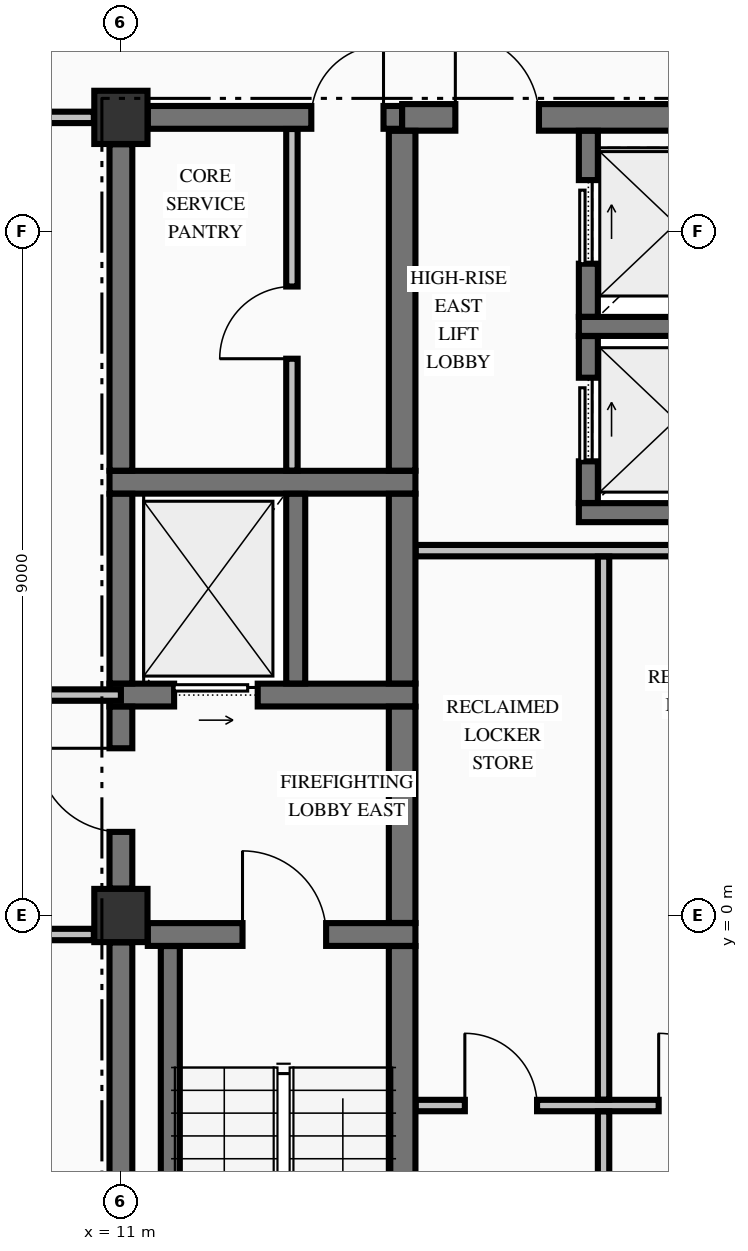
"""IFC4 building model, lengths in metres.
Left out: names, types, materials, properties, quantities, classifications, styles, units other than length and angle.
Written with IfcOpenShell. Run it as: python <this file> out.ifc"""

import sys

from ifc_helpers import new_model, si_unit, direction, frame, frame_2d, origin, origin_2d, place, context, subcontext, project, spatial, rectangle, extrude, element, fill, save


model = new_model("IFC4")
c1 = context("Model", 3, precision=1e-05, world=origin(), true_north=direction((0.0, 1.0)))
c2 = subcontext(c1, "Body", "Model", "MODEL_VIEW")
j1 = project(units=[si_unit("LENGTHUNIT", "METRE"), si_unit("PLANEANGLEUNIT", "RADIAN")], contexts=[c1])
p1 = place(None, origin())
s1 = spatial("IfcSite", under=j1, at=p1, CompositionType="ELEMENT")
p2 = place(p1, origin())
s2 = spatial("IfcBuilding", under=s1, at=p2, CompositionType="ELEMENT")
p3 = place(p2, frame((0.0, 0.0, 242.97)))
s3 = spatial("IfcBuildingStorey", under=s2, at=p3, CompositionType="ELEMENT", Elevation=242.97)
for number, where, z_axis, x_axis in (
    (1, (11.0, 0.0, -0.25), (0.0, 0.0, 1.0), (1.0, 0.0, 0.0)),
    (2, (11.0, 10.5, -0.25), (0.0, 0.0, 1.0), (1.0, 0.0, 0.0)),
):
    element("IfcColumn", number, at=place(p3, frame(where, z_axis=z_axis, x_axis=x_axis)), inside=s3, PredefinedType="COLUMN", context=c2, shape_type="SweptSolid", body=[
        extrude(rectangle(XDim=0.7, YDim=0.7, at=origin_2d()), origin(), (0.0, 0.0, 1.0), 3.23),
    ])
p4 = place(p3, frame((11.354, -0.25, 0.0), z_axis=(0.0, 0.0, 1.0), x_axis=(1.0, 0.0, 0.0)))
e3 = element("IfcWall", 3, at=p4, inside=s3, PredefinedType="SHEAR", context=c2, shape_type="SweptSolid", body=[
    extrude(rectangle(XDim=3.521, YDim=0.3, at=frame_2d((1.76, 0.0))), origin(), (0.0, 0.0, 1.0), 2.98),
])
p5 = place(p4, frame((1.246, 0.0, 0.0)))
e4 = element("IfcOpeningElement", 4, at=p5, cuts=e3, PredefinedType="OPENING", context=c2, shape_type="SweptSolid", body=[
    extrude(rectangle(XDim=1.1, YDim=2.15, at=frame_2d((0.55, 1.075))), frame((0.0, 0.16, 0.0), z_axis=(0.0, -1.0, 0.0), x_axis=(1.0, 0.0, 0.0)), (0.0, 0.0, 1.0), 0.32),
])
p6 = place(p3, frame((10.85, 2.9, 0.0), z_axis=(0.0, 0.0, 1.0), x_axis=(1.0, 0.0, 0.0)))
e5 = element("IfcWall", 5, at=p6, inside=s3, PredefinedType="SHEAR", context=c2, shape_type="SweptSolid", body=[
    extrude(rectangle(XDim=4.025, YDim=0.3, at=frame_2d((2.012, 0.0))), origin(), (0.0, 0.0, 1.0), 2.98),
])
p7 = place(p6, frame((0.85, 0.0, 0.0)))
e6 = element("IfcOpeningElement", 6, at=p7, cuts=e5, PredefinedType="OPENING", context=c2, shape_type="SweptSolid", body=[
    extrude(rectangle(XDim=1.1, YDim=2.2, at=frame_2d((0.55, 1.1))), frame((0.0, 0.16, 0.0), z_axis=(0.0, -1.0, 0.0), x_axis=(1.0, 0.0, 0.0)), (0.0, 0.0, 1.0), 0.32),
])
p8 = place(p3, frame((17.025, 5.3, 0.0), z_axis=(0.0, 0.0, 1.0), x_axis=(1.0, 0.0, 0.0)))
e7 = element("IfcWall", 7, at=p8, inside=s3, PredefinedType="SOLIDWALL", context=c2, shape_type="SweptSolid", body=[
    extrude(rectangle(XDim=3.15, YDim=0.25, at=frame_2d((1.575, 0.0))), origin(), (0.0, 0.0, 1.0), 2.98),
])
p9 = place(p3, frame((10.85, 5.7, 0.0), z_axis=(0.0, 0.0, 1.0), x_axis=(1.0, 0.0, 0.0)))
e8 = element("IfcWall", 8, at=p9, inside=s3, PredefinedType="SHEAR", context=c2, shape_type="SweptSolid", body=[
    extrude(rectangle(XDim=4.025, YDim=0.3, at=frame_2d((2.012, 0.0))), origin(), (0.0, 0.0, 1.0), 2.98),
])
p10 = place(p3, frame((17.025, 7.75, 0.0), z_axis=(0.0, 0.0, 1.0), x_axis=(1.0, 0.0, 0.0)))
e9 = element("IfcWall", 9, at=p10, inside=s3, PredefinedType="SOLIDWALL", context=c2, shape_type="SweptSolid", body=[
    extrude(rectangle(XDim=3.15, YDim=0.25, at=frame_2d((1.575, 0.0))), origin(), (0.0, 0.0, 1.0), 2.98),
])
p11 = place(p3, frame((11.354, 10.5, 0.0), z_axis=(0.0, 0.0, 1.0), x_axis=(1.0, 0.0, 0.0)))
e10 = element("IfcWall", 10, at=p11, inside=s3, PredefinedType="SHEAR", context=c2, shape_type="SweptSolid", body=[
    extrude(rectangle(XDim=3.346, YDim=0.3, at=frame_2d((1.673, 0.0))), origin(), (0.0, 0.0, 1.0), 2.98),
])
p12 = place(p11, frame((2.151, 0.0, 0.0)))
e11 = element("IfcOpeningElement", 11, at=p12, cuts=e10, PredefinedType="OPENING", context=c2, shape_type="SweptSolid", body=[
    extrude(rectangle(XDim=0.95, YDim=2.15, at=frame_2d((0.475, 1.075))), frame((0.0, 0.16, 0.0), z_axis=(0.0, -1.0, 0.0), x_axis=(1.0, 0.0, 0.0)), (0.0, 0.0, 1.0), 0.32),
])
p13 = place(p3, frame((14.7, 10.5, 0.0), z_axis=(0.0, 0.0, 1.0), x_axis=(1.0, 0.0, 0.0)))
e12 = element("IfcWall", 12, at=p13, inside=s3, PredefinedType="SHEAR", context=c2, shape_type="SweptSolid", body=[
    extrude(rectangle(XDim=4.946, YDim=0.35, at=frame_2d((2.473, 0.0))), origin(), (0.0, 0.0, 1.0), 2.98),
])
p14 = place(p13, frame((0.7, 0.0, 0.0)))
e13 = element("IfcOpeningElement", 13, at=p14, cuts=e12, PredefinedType="OPENING", context=c2, shape_type="SweptSolid", body=[
    extrude(rectangle(XDim=1.1, YDim=2.15, at=frame_2d((0.55, 1.075))), frame((0.0, 0.185, 0.0), z_axis=(0.0, -1.0, 0.0), x_axis=(1.0, 0.0, 0.0)), (0.0, 0.0, 1.0), 0.37),
])
p15 = place(p3, frame((14.878, -2.5, 0.0), z_axis=(0.0, 0.0, 1.0), x_axis=(1.0, 0.0, 0.0)))
e14 = element("IfcWall", 14, at=p15, inside=s3, PredefinedType="PARTITIONING", context=c2, shape_type="SweptSolid", body=[
    extrude(rectangle(XDim=4.944, YDim=0.15, at=frame_2d((2.472, 0.0))), origin(), (0.0, 0.0, 1.0), 2.98),
])
p16 = place(p15, frame((0.647, 0.0, 0.0)))
e15 = element("IfcOpeningElement", 15, at=p16, cuts=e14, PredefinedType="OPENING", context=c2, shape_type="SweptSolid", body=[
    extrude(rectangle(XDim=0.95, YDim=2.15, at=frame_2d((0.475, 1.075))), frame((0.0, 0.085, 0.0), z_axis=(0.0, -1.0, 0.0), x_axis=(1.0, 0.0, 0.0)), (0.0, 0.0, 1.0), 0.17),
])
p17 = place(p15, frame((3.197, 0.0, 0.0)))
e16 = element("IfcOpeningElement", 16, at=p17, cuts=e14, PredefinedType="OPENING", context=c2, shape_type="SweptSolid", body=[
    extrude(rectangle(XDim=0.95, YDim=2.15, at=frame_2d((0.475, 1.075))), frame((0.0, 0.085, 0.0), z_axis=(0.0, -1.0, 0.0), x_axis=(1.0, 0.0, 0.0)), (0.0, 0.0, 1.0), 0.17),
])
p18 = place(p3, frame((-10.644, -0.25, 0.0), z_axis=(0.0, 0.0, 1.0), x_axis=(1.0, 0.0, 0.0)))
e17 = element("IfcWall", 17, at=p18, inside=s3, PredefinedType="PARTITIONING", context=c2, shape_type="SweptSolid", body=[
    extrude(rectangle(XDim=21.288, YDim=0.15, at=frame_2d((10.644, 0.0))), origin(), (0.0, 0.0, 1.0), 2.98),
])
p19 = place(p18, frame((13.544, 0.0, 0.0)))
e18 = element("IfcOpeningElement", 18, at=p19, cuts=e17, PredefinedType="OPENING", context=c2, shape_type="SweptSolid", body=[
    extrude(rectangle(XDim=1.1, YDim=2.15, at=frame_2d((0.55, 1.075))), frame((0.0, 0.085, 0.0), z_axis=(0.0, -1.0, 0.0), x_axis=(1.0, 0.0, 0.0)), (0.0, 0.0, 1.0), 0.17),
])
p20 = place(p18, frame((5.789, 0.0, 0.0)))
e19 = element("IfcOpeningElement", 19, at=p20, cuts=e17, PredefinedType="OPENING", context=c2, shape_type="SweptSolid", body=[
    extrude(rectangle(XDim=1.05, YDim=2.15, at=frame_2d((0.525, 1.075))), frame((0.0, 0.085, 0.0), z_axis=(0.0, -1.0, 0.0), x_axis=(1.0, 0.0, 0.0)), (0.0, 0.0, 1.0), 0.17),
])
p21 = place(p18, frame((17.949, 0.0, 0.0)))
e20 = element("IfcOpeningElement", 20, at=p21, cuts=e17, PredefinedType="OPENING", context=c2, shape_type="SweptSolid", body=[
    extrude(rectangle(XDim=0.95, YDim=2.15, at=frame_2d((0.475, 1.075))), frame((0.0, 0.085, 0.0), z_axis=(0.0, -1.0, 0.0), x_axis=(1.0, 0.0, 0.0)), (0.0, 0.0, 1.0), 0.17),
])
p22 = place(p3, frame((-11.0, 2.9, 0.0), z_axis=(0.0, 0.0, 1.0), x_axis=(1.0, 0.0, 0.0)))
e21 = element("IfcWall", 21, at=p22, inside=s3, PredefinedType="PARTITIONING", context=c2, shape_type="SweptSolid", body=[
    extrude(rectangle(XDim=22.0, YDim=0.15, at=frame_2d((11.0, 0.0))), origin(), (0.0, 0.0, 1.0), 2.98),
])
p23 = place(p22, frame((13.9, 0.0, 0.0)))
e22 = element("IfcOpeningElement", 22, at=p23, cuts=e21, PredefinedType="OPENING", context=c2, shape_type="SweptSolid", body=[
    extrude(rectangle(XDim=1.1, YDim=2.15, at=frame_2d((0.55, 1.075))), frame((0.0, 0.085, 0.0), z_axis=(0.0, -1.0, 0.0), x_axis=(1.0, 0.0, 0.0)), (0.0, 0.0, 1.0), 0.17),
])
p24 = place(p22, frame((6.145, 0.0, 0.0)))
e23 = element("IfcOpeningElement", 23, at=p24, cuts=e21, PredefinedType="OPENING", context=c2, shape_type="SweptSolid", body=[
    extrude(rectangle(XDim=1.05, YDim=2.15, at=frame_2d((0.525, 1.075))), frame((0.0, 0.085, 0.0), z_axis=(0.0, -1.0, 0.0), x_axis=(1.0, 0.0, 0.0)), (0.0, 0.0, 1.0), 0.17),
])
p25 = place(p22, frame((18.23, 0.0, 0.0)))
e24 = element("IfcOpeningElement", 24, at=p25, cuts=e21, PredefinedType="OPENING", context=c2, shape_type="SweptSolid", body=[
    extrude(rectangle(XDim=1.1, YDim=2.15, at=frame_2d((0.55, 1.075))), frame((0.0, 0.085, 0.0), z_axis=(0.0, -1.0, 0.0), x_axis=(1.0, 0.0, 0.0)), (0.0, 0.0, 1.0), 0.17),
])
p26 = place(p3, frame((14.878, 4.8, 0.0), z_axis=(0.0, 0.0, 1.0), x_axis=(1.0, 0.0, 0.0)))
e25 = element("IfcWall", 25, at=p26, inside=s3, PredefinedType="PARTITIONING", context=c2, shape_type="SweptSolid", body=[
    extrude(rectangle(XDim=4.944, YDim=0.15, at=frame_2d((2.472, 0.0))), origin(), (0.0, 0.0, 1.0), 2.98),
])
p27 = place(p3, frame((-10.644, 10.5, 0.0), z_axis=(0.0, 0.0, 1.0), x_axis=(1.0, 0.0, 0.0)))
e26 = element("IfcWall", 26, at=p27, inside=s3, PredefinedType="PARTITIONING", context=c2, shape_type="SweptSolid", body=[
    extrude(rectangle(XDim=21.288, YDim=0.15, at=frame_2d((10.644, 0.0))), origin(), (0.0, 0.0, 1.0), 2.98),
])
p28 = place(p27, frame((13.544, 0.0, 0.0)))
e27 = element("IfcOpeningElement", 27, at=p28, cuts=e26, PredefinedType="OPENING", context=c2, shape_type="SweptSolid", body=[
    extrude(rectangle(XDim=1.1, YDim=2.15, at=frame_2d((0.55, 1.075))), frame((0.0, 0.085, 0.0), z_axis=(0.0, -1.0, 0.0), x_axis=(1.0, 0.0, 0.0)), (0.0, 0.0, 1.0), 0.17),
])
p29 = place(p3, frame((11.0, -9.596, 0.0), z_axis=(0.0, 0.0, 1.0), x_axis=(0.0, 1.0, 0.0)))
e28 = element("IfcWall", 28, at=p29, inside=s3, PredefinedType="SHEAR", context=c2, shape_type="SweptSolid", body=[
    extrude(rectangle(XDim=9.242, YDim=0.3, at=frame_2d((4.621, 0.0))), origin(), (0.0, 0.0, 1.0), 2.98),
])
p30 = place(p3, frame((11.0, 0.354, 0.0), z_axis=(0.0, 0.0, 1.0), x_axis=(0.0, 1.0, 0.0)))
e29 = element("IfcWall", 29, at=p30, inside=s3, PredefinedType="SHEAR", context=c2, shape_type="SweptSolid", body=[
    extrude(rectangle(XDim=2.394, YDim=0.3, at=frame_2d((1.197, 0.0))), origin(), (0.0, 0.0, 1.0), 2.98),
])
p31 = place(p30, frame((0.746, 0.0, 0.0)))
e30 = element("IfcOpeningElement", 30, at=p31, cuts=e29, PredefinedType="OPENING", context=c2, shape_type="SweptSolid", body=[
    extrude(rectangle(XDim=1.1, YDim=2.15, at=frame_2d((0.55, 1.075))), frame((0.0, 0.16, 0.0), z_axis=(0.0, -1.0, 0.0), x_axis=(1.0, 0.0, 0.0)), (0.0, 0.0, 1.0), 0.32),
])
p32 = place(p3, frame((11.0, 3.052, 0.0), z_axis=(0.0, 0.0, 1.0), x_axis=(0.0, 1.0, 0.0)))
e31 = element("IfcWall", 31, at=p32, inside=s3, PredefinedType="SHEAR", context=c2, shape_type="SweptSolid", body=[
    extrude(rectangle(XDim=2.496, YDim=0.3, at=frame_2d((1.248, 0.0))), origin(), (0.0, 0.0, 1.0), 2.98),
])
p33 = place(p3, frame((11.0, 5.852, 0.0), z_axis=(0.0, 0.0, 1.0), x_axis=(0.0, 1.0, 0.0)))
e32 = element("IfcWall", 32, at=p33, inside=s3, PredefinedType="SHEAR", context=c2, shape_type="SweptSolid", body=[
    extrude(rectangle(XDim=4.294, YDim=0.3, at=frame_2d((2.147, 0.0))), origin(), (0.0, 0.0, 1.0), 2.98),
])
p34 = place(p3, frame((11.65, -9.798, 0.0), z_axis=(0.0, 0.0, 1.0), x_axis=(0.0, 1.0, 0.0)))
e33 = element("IfcWall", 33, at=p34, inside=s3, PredefinedType="SOLIDWALL", context=c2, shape_type="SweptSolid", body=[
    extrude(rectangle(XDim=9.396, YDim=0.25, at=frame_2d((4.698, 0.0))), origin(), (0.0, 0.0, 1.0), 2.98),
])
p35 = place(p3, frame((13.3, 3.052, 0.0), z_axis=(0.0, 0.0, 1.0), x_axis=(0.0, 1.0, 0.0)))
e34 = element("IfcWall", 34, at=p35, inside=s3, PredefinedType="SOLIDWALL", context=c2, shape_type="SweptSolid", body=[
    extrude(rectangle(XDim=2.496, YDim=0.25, at=frame_2d((1.248, 0.0))), origin(), (0.0, 0.0, 1.0), 2.98),
])
p36 = place(p3, frame((14.7, -9.773, 0.0), z_axis=(0.0, 0.0, 1.0), x_axis=(0.0, 1.0, 0.0)))
e35 = element("IfcWall", 35, at=p36, inside=s3, PredefinedType="SHEAR", context=c2, shape_type="SweptSolid", body=[
    extrude(rectangle(XDim=9.371, YDim=0.35, at=frame_2d((4.686, 0.0))), origin(), (0.0, 0.0, 1.0), 2.98),
])
p37 = place(p3, frame((14.7, -0.098, 0.0), z_axis=(0.0, 0.0, 1.0), x_axis=(0.0, 1.0, 0.0)))
e36 = element("IfcWall", 36, at=p37, inside=s3, PredefinedType="SHEAR", context=c2, shape_type="SweptSolid", body=[
    extrude(rectangle(XDim=2.846, YDim=0.35, at=frame_2d((1.423, 0.0))), origin(), (0.0, 0.0, 1.0), 2.98),
])
p38 = place(p3, frame((14.7, 3.052, 0.0), z_axis=(0.0, 0.0, 1.0), x_axis=(0.0, 1.0, 0.0)))
e37 = element("IfcWall", 37, at=p38, inside=s3, PredefinedType="SHEAR", context=c2, shape_type="SweptSolid", body=[
    extrude(rectangle(XDim=2.496, YDim=0.35, at=frame_2d((1.248, 0.0))), origin(), (0.0, 0.0, 1.0), 2.98),
])
p39 = place(p3, frame((14.7, 5.852, 0.0), z_axis=(0.0, 0.0, 1.0), x_axis=(0.0, 1.0, 0.0)))
e38 = element("IfcWall", 38, at=p39, inside=s3, PredefinedType="SHEAR", context=c2, shape_type="SweptSolid", body=[
    extrude(rectangle(XDim=4.471, YDim=0.35, at=frame_2d((2.235, 0.0))), origin(), (0.0, 0.0, 1.0), 2.98),
])
p40 = place(p3, frame((17.15, 5.427, 0.0), z_axis=(0.0, 0.0, 1.0), x_axis=(0.0, 1.0, 0.0)))
e39 = element("IfcWall", 39, at=p40, inside=s3, PredefinedType="SOLIDWALL", context=c2, shape_type="SweptSolid", body=[
    extrude(rectangle(XDim=2.196, YDim=0.25, at=frame_2d((1.098, 0.0))), origin(), (0.0, 0.0, 1.0), 2.98),
])
p41 = place(p40, frame((0.548, 0.0, 0.0)))
e40 = element("IfcOpeningElement", 40, at=p41, cuts=e39, PredefinedType="OPENING", context=c2, shape_type="SweptSolid", body=[
    extrude(rectangle(XDim=1.1, YDim=2.2, at=frame_2d((0.55, 1.1))), frame((0.0, 0.135, 0.0), z_axis=(0.0, -1.0, 0.0), x_axis=(1.0, 0.0, 0.0)), (0.0, 0.0, 1.0), 0.27),
])
p42 = place(p3, frame((17.15, 7.877, 0.0), z_axis=(0.0, 0.0, 1.0), x_axis=(0.0, 1.0, 0.0)))
e41 = element("IfcWall", 41, at=p42, inside=s3, PredefinedType="SOLIDWALL", context=c2, shape_type="SweptSolid", body=[
    extrude(rectangle(XDim=2.446, YDim=0.25, at=frame_2d((1.223, 0.0))), origin(), (0.0, 0.0, 1.0), 2.98),
])
p43 = place(p42, frame((0.698, 0.0, 0.0)))
e42 = element("IfcOpeningElement", 42, at=p43, cuts=e41, PredefinedType="OPENING", context=c2, shape_type="SweptSolid", body=[
    extrude(rectangle(XDim=1.1, YDim=2.2, at=frame_2d((0.55, 1.1))), frame((0.0, 0.135, 0.0), z_axis=(0.0, -1.0, 0.0), x_axis=(1.0, 0.0, 0.0)), (0.0, 0.0, 1.0), 0.27),
])
p44 = place(p3, frame((13.25, 5.853, 0.0), z_axis=(0.0, 0.0, 1.0), x_axis=(0.0, 1.0, 0.0)))
e43 = element("IfcWall", 43, at=p44, inside=s3, PredefinedType="PARTITIONING", context=c2, shape_type="SweptSolid", body=[
    extrude(rectangle(XDim=4.494, YDim=0.15, at=frame_2d((2.247, 0.0))), origin(), (0.0, 0.0, 1.0), 2.98),
])
p45 = place(p44, frame((1.472, 0.0, 0.0)))
e44 = element("IfcOpeningElement", 44, at=p45, cuts=e43, PredefinedType="OPENING", context=c2, shape_type="SweptSolid", body=[
    extrude(rectangle(XDim=0.95, YDim=2.15, at=frame_2d((0.475, 1.075))), frame((0.0, 0.085, 0.0), z_axis=(0.0, -1.0, 0.0), x_axis=(1.0, 0.0, 0.0)), (0.0, 0.0, 1.0), 0.17),
])
p46 = place(p3, frame((17.35, -9.772, 0.0), z_axis=(0.0, 0.0, 1.0), x_axis=(0.0, 1.0, 0.0)))
e45 = element("IfcWall", 45, at=p46, inside=s3, PredefinedType="PARTITIONING", context=c2, shape_type="SweptSolid", body=[
    extrude(rectangle(XDim=7.194, YDim=0.15, at=frame_2d((3.597, 0.0))), origin(), (0.0, 0.0, 1.0), 2.98),
])
p47 = place(p3, frame((17.35, -2.422, 0.0), z_axis=(0.0, 0.0, 1.0), x_axis=(0.0, 1.0, 0.0)))
e46 = element("IfcWall", 46, at=p47, inside=s3, PredefinedType="PARTITIONING", context=c2, shape_type="SweptSolid", body=[
    extrude(rectangle(XDim=7.144, YDim=0.15, at=frame_2d((3.572, 0.0))), origin(), (0.0, 0.0, 1.0), 2.98),
])
p48 = place(p5, origin())
e47 = element("IfcDoor", 47, at=p48, inside=s3, OperationType="SINGLE_SWING_LEFT", PredefinedType="DOOR", context=c2, shape_type="SweptSolid", body=[
    extrude(rectangle(XDim=1.1, YDim=2.15, at=frame_2d((0.55, 1.075))), frame((0.0, 0.025, 0.0), z_axis=(0.0, -1.0, 0.0), x_axis=(1.0, 0.0, 0.0)), (0.0, 0.0, 1.0), 0.05),
])
fill(e4, e47)
p49 = place(p31, origin())
e48 = element("IfcDoor", 48, at=p49, inside=s3, OperationType="SINGLE_SWING_RIGHT", PredefinedType="DOOR", context=c2, shape_type="SweptSolid", body=[
    extrude(rectangle(XDim=1.1, YDim=2.15, at=frame_2d((0.55, 1.075))), frame((0.0, 0.025, 0.0), z_axis=(0.0, -1.0, 0.0), x_axis=(1.0, 0.0, 0.0)), (0.0, 0.0, 1.0), 0.05),
])
fill(e30, e48)
p50 = place(p7, origin())
e49 = element("IfcDoor", 49, at=p50, inside=s3, OperationType="SLIDING_TO_RIGHT", PredefinedType="DOOR", context=c2, shape_type="SweptSolid", body=[
    extrude(rectangle(XDim=1.1, YDim=2.2, at=frame_2d((0.55, 1.1))), frame((0.0, 0.025, 0.0), z_axis=(0.0, -1.0, 0.0), x_axis=(1.0, 0.0, 0.0)), (0.0, 0.0, 1.0), 0.05),
])
fill(e6, e49)
p51 = place(p12, origin())
e50 = element("IfcDoor", 50, at=p51, inside=s3, OperationType="SINGLE_SWING_RIGHT", PredefinedType="DOOR", context=c2, shape_type="SweptSolid", body=[
    extrude(rectangle(XDim=0.95, YDim=2.15, at=frame_2d((0.475, 1.075))), frame((0.0, 0.025, 0.0), z_axis=(0.0, -1.0, 0.0), x_axis=(1.0, 0.0, 0.0)), (0.0, 0.0, 1.0), 0.05),
])
fill(e11, e50)
p52 = place(p45, origin())
e51 = element("IfcDoor", 51, at=p52, inside=s3, OperationType="SINGLE_SWING_LEFT", PredefinedType="DOOR", context=c2, shape_type="SweptSolid", body=[
    extrude(rectangle(XDim=0.95, YDim=2.15, at=frame_2d((0.475, 1.075))), frame((0.0, 0.025, 0.0), z_axis=(0.0, -1.0, 0.0), x_axis=(1.0, 0.0, 0.0)), (0.0, 0.0, 1.0), 0.05),
])
fill(e44, e51)
p53 = place(p41, origin())
e52 = element("IfcDoor", 52, at=p53, inside=s3, OperationType="SLIDING_TO_RIGHT", PredefinedType="DOOR", context=c2, shape_type="SweptSolid", body=[
    extrude(rectangle(XDim=1.1, YDim=2.2, at=frame_2d((0.55, 1.1))), frame((0.0, 0.025, 0.0), z_axis=(0.0, -1.0, 0.0), x_axis=(1.0, 0.0, 0.0)), (0.0, 0.0, 1.0), 0.05),
])
fill(e40, e52)
p54 = place(p43, origin())
e53 = element("IfcDoor", 53, at=p54, inside=s3, OperationType="SLIDING_TO_RIGHT", PredefinedType="DOOR", context=c2, shape_type="SweptSolid", body=[
    extrude(rectangle(XDim=1.1, YDim=2.2, at=frame_2d((0.55, 1.1))), frame((0.0, 0.025, 0.0), z_axis=(0.0, -1.0, 0.0), x_axis=(1.0, 0.0, 0.0)), (0.0, 0.0, 1.0), 0.05),
])
fill(e42, e53)
p55 = place(p14, origin())
e54 = element("IfcDoor", 54, at=p55, inside=s3, OperationType="SINGLE_SWING_LEFT", PredefinedType="DOOR", context=c2, shape_type="SweptSolid", body=[
    extrude(rectangle(XDim=1.1, YDim=2.15, at=frame_2d((0.55, 1.075))), frame((0.0, 0.025, 0.0), z_axis=(0.0, -1.0, 0.0), x_axis=(1.0, 0.0, 0.0)), (0.0, 0.0, 1.0), 0.05),
])
fill(e13, e54)
p56 = place(p16, origin())
e55 = element("IfcDoor", 55, at=p56, inside=s3, OperationType="SINGLE_SWING_LEFT", PredefinedType="DOOR", context=c2, shape_type="SweptSolid", body=[
    extrude(rectangle(XDim=0.95, YDim=2.15, at=frame_2d((0.475, 1.075))), frame((0.0, 0.025, 0.0), z_axis=(0.0, -1.0, 0.0), x_axis=(1.0, 0.0, 0.0)), (0.0, 0.0, 1.0), 0.05),
])
fill(e15, e55)
p57 = place(p17, origin())
e56 = element("IfcDoor", 56, at=p57, inside=s3, OperationType="SINGLE_SWING_LEFT", PredefinedType="DOOR", context=c2, shape_type="SweptSolid", body=[
    extrude(rectangle(XDim=0.95, YDim=2.15, at=frame_2d((0.475, 1.075))), frame((0.0, 0.025, 0.0), z_axis=(0.0, -1.0, 0.0), x_axis=(1.0, 0.0, 0.0)), (0.0, 0.0, 1.0), 0.05),
])
fill(e16, e56)
save(model, sys.argv[1])
